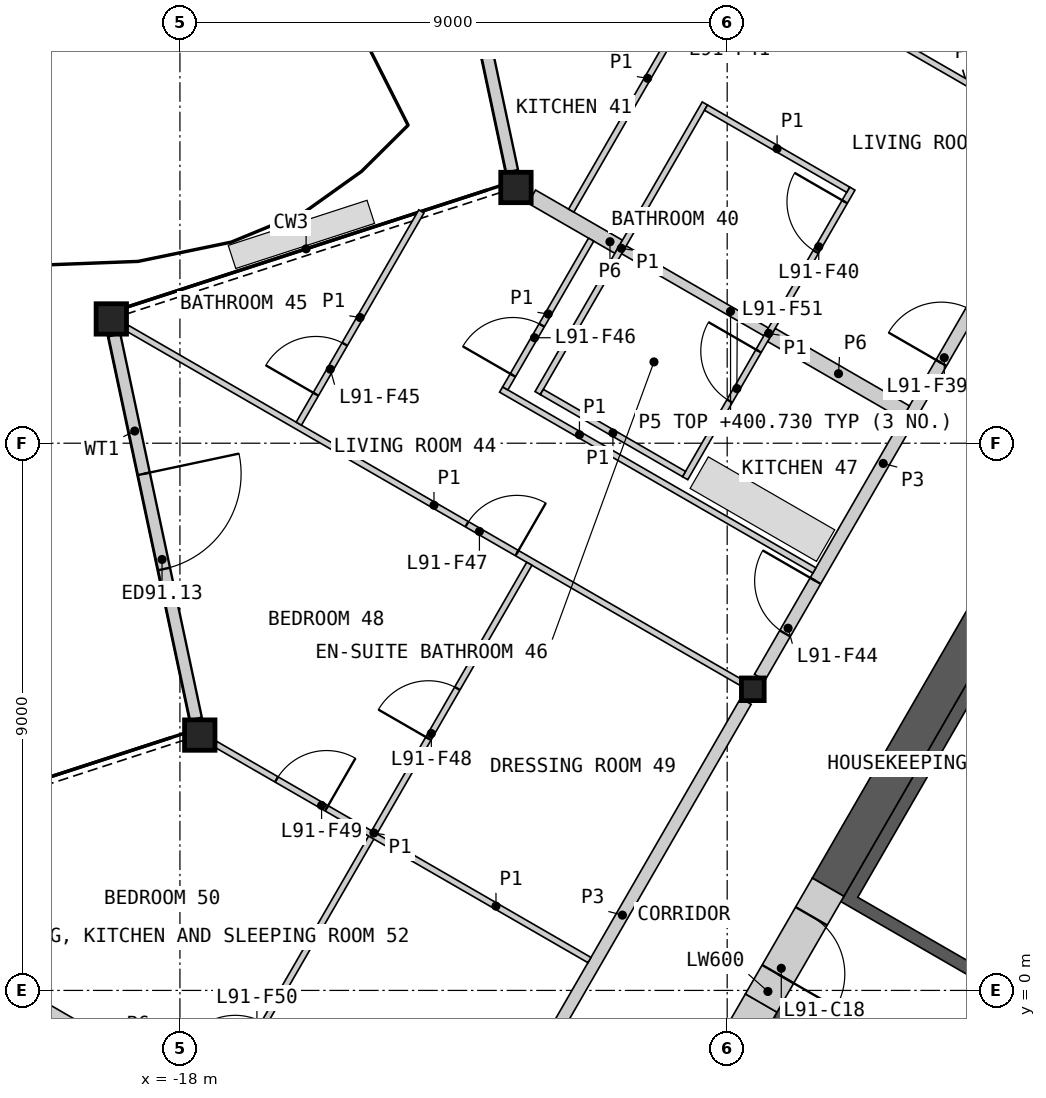
"""IFC4 building model, lengths in metres.
Left out: names, types, materials, properties, quantities, classifications, styles, units other than length and angle.
Written with IfcOpenShell. Run it as: python <this file> out.ifc"""

import sys

from ifc_helpers import new_model, si_unit, direction, frame, frame_2d, origin, origin_2d, place, context, subcontext, project, spatial, polyline, rectangle, hollow_rectangle, i_section, outline, extrude, element, fill, save


model = new_model("IFC4")
c1 = context("Model", 3, precision=1e-05, world=origin(), true_north=direction((0.0, 1.0)))
c2 = subcontext(c1, "Body", "Model", "MODEL_VIEW")
j1 = project(units=[si_unit("LENGTHUNIT", "METRE"), si_unit("PLANEANGLEUNIT", "RADIAN")], contexts=[c1])
p1 = place(None, origin())
s1 = spatial("IfcSite", under=j1, at=p1, CompositionType="ELEMENT")
p2 = place(p1, origin())
s2 = spatial("IfcBuilding", under=s1, at=p2, CompositionType="ELEMENT")
p3 = place(p2, frame((0.0, 0.0, 398.4)))
s3 = spatial("IfcBuildingStorey", under=s2, at=p3, CompositionType="ELEMENT", Elevation=398.4)
for number, where, z_axis, x_axis in (
    (1, (-12.474, 13.206, 0.0), (0.0, 0.0, 1.0), (1.0, 0.0, 0.0)),
    (2, (-19.129, 11.044, 0.0), (0.0, 0.0, 1.0), (1.0, 0.0, 0.0)),
    (3, (-17.674, 4.199, 0.0), (0.0, 0.0, 1.0), (1.0, 0.0, 0.0)),
):
    element("IfcColumn", number, at=place(p3, frame(where, z_axis=z_axis, x_axis=x_axis)), inside=s3, PredefinedType="COLUMN", context=c2, shape_type="SweptSolid", body=[
        extrude(hollow_rectangle(XDim=0.5, YDim=0.5, WallThickness=0.03, at=origin_2d()), origin(), (0.0, 0.0, 1.0), 3.4),
    ])
p4 = place(p3, frame((-8.578, 4.953, 0.0), z_axis=(0.0, 0.0, 1.0), x_axis=(1.0, 0.0, 0.0)))
e4 = element("IfcColumn", 4, at=p4, inside=s3, PredefinedType="COLUMN", context=c2, shape_type="SweptSolid", body=[
    extrude(i_section(OverallWidth=0.374, OverallDepth=0.372, WebThickness=0.016, FlangeThickness=0.026, at=origin_2d()), origin(), (0.0, 0.0, 1.0), 3.4),
])
p5 = place(p3, frame((-13.879, 19.785, 0.0), z_axis=(0.0, 0.0, 1.0), x_axis=(0.207895859675, -0.978150965613, 0.0)))
e5 = element("IfcWall", 5, at=p5, inside=s3, PredefinedType="SOLIDWALL", context=c2, shape_type="SweptSolid", body=[
    extrude(rectangle(XDim=6.453, YDim=0.2, at=frame_2d((3.227, 0.0))), origin(), (0.0, 0.0, 1.0), 2.634),
])
p6 = place(p5, frame((2.333, 0.0, 0.0)))
e6 = element("IfcOpeningElement", 6, at=p6, cuts=e5, PredefinedType="OPENING", context=c2, shape_type="SweptSolid", body=[
    extrude(rectangle(XDim=1.6, YDim=2.25, at=frame_2d((0.8, 1.125))), frame((0.0, 0.11, 0.0), z_axis=(0.0, -1.0, 0.0), x_axis=(1.0, 0.0, 0.0)), (0.0, 0.0, 1.0), 0.22),
])
p7 = place(p3, frame((-19.079, 10.778, 0.0), z_axis=(0.0, 0.0, 1.0), x_axis=(0.207888166349, -0.978152600718, 0.0)))
e7 = element("IfcWall", 7, at=p7, inside=s3, PredefinedType="SOLIDWALL", context=c2, shape_type="SweptSolid", body=[
    extrude(rectangle(XDim=6.453, YDim=0.2, at=frame_2d((3.227, 0.0))), origin(), (0.0, 0.0, 1.0), 2.634),
])
p8 = place(p7, frame((2.333, 0.0, 0.0)))
e8 = element("IfcOpeningElement", 8, at=p8, cuts=e7, PredefinedType="OPENING", context=c2, shape_type="SweptSolid", body=[
    extrude(rectangle(XDim=1.6, YDim=2.25, at=frame_2d((0.8, 1.125))), frame((0.0, 0.11, 0.0), z_axis=(0.0, -1.0, 0.0), x_axis=(1.0, 0.0, 0.0)), (0.0, 0.0, 1.0), 0.22),
])
p9 = place(p3, origin())
e9 = element("IfcWall", 9, at=p9, inside=s3, PredefinedType="SHEAR", context=c2, shape_type="SweptSolid", body=[
    extrude(outline(polyline([(-6.061, -1.697), (-8.231, -0.444), (-8.131, -0.271), (-5.96, -1.524), (-6.061, -1.697)])), origin(), (0.0, 0.0, 1.0), 3.1),
])
p10 = place(p3, origin())
e10 = element("IfcWall", 10, at=p10, inside=s3, PredefinedType="SHEAR", context=c2, shape_type="SweptSolid", body=[
    extrude(outline(polyline([(-4.96, 0.208), (-7.131, 1.461), (-3.731, 7.35), (-1.561, 6.097), (-1.66, 5.924), (-3.652, 7.074), (-6.852, 1.531), (-4.861, 0.381), (-4.96, 0.208)])), origin(), (0.0, 0.0, 1.0), 3.1),
])
p11 = place(p3, frame((-3.794, 7.84, 0.0), z_axis=(0.0, 0.0, 1.0), x_axis=(-0.499974747889, -0.866039982607, 0.0)))
e11 = element("IfcWall", 11, at=p11, inside=s3, PredefinedType="SHEAR", context=c2, shape_type="SweptSolid", body=[
    extrude(rectangle(XDim=7.092, YDim=0.6, at=frame_2d((3.546, 0.0))), origin(), (0.0, 0.0, 1.0), 3.1),
])
p12 = place(p3, frame((-8.44, -0.208, 0.0), z_axis=(0.0, 0.0, 1.0), x_axis=(-0.499997052475, -0.866027105532, 0.0)))
e12 = element("IfcWall", 12, at=p12, inside=s3, PredefinedType="SHEAR", context=c2, shape_type="SweptSolid", body=[
    extrude(rectangle(XDim=3.001, YDim=0.6, at=frame_2d((1.501, 0.0))), origin(), (0.0, 0.0, 1.0), 3.1),
])
p13 = place(p12, frame((1.4, 0.0, 0.0)))
e13 = element("IfcOpeningElement", 13, at=p13, cuts=e12, PredefinedType="OPENING", context=c2, shape_type="SweptSolid", body=[
    extrude(rectangle(XDim=1.0, YDim=2.1, at=frame_2d((0.5, 1.05))), frame((0.0, 0.31, 0.0), z_axis=(0.0, -1.0, 0.0), x_axis=(1.0, 0.0, 0.0)), (0.0, 0.0, 1.0), 0.62),
])
p14 = place(p3, frame((-7.34, 1.698, 0.0), z_axis=(0.0, 0.0, 1.0), x_axis=(-0.50002983664, -0.866008176907, 0.0)))
e14 = element("IfcWall", 14, at=p14, inside=s3, PredefinedType="SHEAR", context=c2, shape_type="SweptSolid", body=[
    extrude(rectangle(XDim=2.2, YDim=0.6, at=frame_2d((1.1, 0.0))), origin(), (0.0, 0.0, 1.0), 3.1),
])
p15 = place(p14, frame((0.55, 0.0, 0.0)))
e15 = element("IfcOpeningElement", 15, at=p15, cuts=e14, PredefinedType="OPENING", context=c2, shape_type="SweptSolid", body=[
    extrude(rectangle(XDim=1.1, YDim=2.1, at=frame_2d((0.55, 1.05))), frame((0.0, 0.31, 0.0), z_axis=(0.0, -1.0, 0.0), x_axis=(1.0, 0.0, 0.0)), (0.0, 0.0, 1.0), 0.62),
])
p16 = place(p3, frame((-24.069, 1.887, 0.0), z_axis=(0.0, 0.0, 1.0), x_axis=(0.866023404247, -0.500003463284, 0.0)))
e16 = element("IfcWall", 16, at=p16, inside=s3, PredefinedType="PARTITIONING", context=c2, shape_type="SweptSolid", body=[
    extrude(rectangle(XDim=11.782, YDim=0.25, at=frame_2d((5.891, 0.0))), origin(), (0.0, 0.0, 1.0), 2.33),
])
p17 = place(p3, frame((-8.465, 5.15, 0.0), z_axis=(0.0, 0.0, 1.0), x_axis=(0.499992155518, 0.866029932751, 0.0)))
e17 = element("IfcWall", 17, at=p17, inside=s3, PredefinedType="PARTITIONING", context=c2, shape_type="SweptSolid", body=[
    extrude(rectangle(XDim=8.123, YDim=0.2, at=frame_2d((4.062, 0.0))), origin(), (0.0, 0.0, 1.0), 3.1),
])
p18 = place(p17, frame((5.97, 0.0, 0.0)))
e18 = element("IfcOpeningElement", 18, at=p18, cuts=e17, PredefinedType="OPENING", context=c2, shape_type="SweptSolid", body=[
    extrude(rectangle(XDim=1.0, YDim=2.1, at=frame_2d((0.5, 1.05))), frame((0.0, 0.11, 0.0), z_axis=(0.0, -1.0, 0.0), x_axis=(1.0, 0.0, 0.0)), (0.0, 0.0, 1.0), 0.22),
])
p19 = place(p17, frame((0.832, 0.0, 0.0)))
e19 = element("IfcOpeningElement", 19, at=p19, cuts=e17, PredefinedType="OPENING", context=c2, shape_type="SweptSolid", body=[
    extrude(rectangle(XDim=1.0, YDim=2.1, at=frame_2d((0.5, 1.05))), frame((0.0, 0.11, 0.0), z_axis=(0.0, -1.0, 0.0), x_axis=(1.0, 0.0, 0.0)), (0.0, 0.0, 1.0), 0.22),
])
p20 = place(p3, frame((-12.754, -2.279, 0.0), z_axis=(0.0, 0.0, 1.0), x_axis=(0.500001682468, 0.866024432409, 0.0)))
e20 = element("IfcWall", 20, at=p20, inside=s3, PredefinedType="PARTITIONING", context=c2, shape_type="SweptSolid", body=[
    extrude(rectangle(XDim=8.124, YDim=0.2, at=frame_2d((4.062, 0.0))), origin(), (0.0, 0.0, 1.0), 3.1),
])
p21 = place(p3, frame((-8.273, 10.781, 0.0), z_axis=(0.0, 0.0, 1.0), x_axis=(0.866030925526, -0.499990435942, 0.0)))
e21 = element("IfcWall", 21, at=p21, inside=s3, PredefinedType="PARTITIONING", context=c2, shape_type="SweptSolid", body=[
    extrude(rectangle(XDim=2.55, YDim=0.25, at=frame_2d((1.275, 0.0))), origin(), (0.0, 0.0, 1.0), 2.33),
])
p22 = place(p3, frame((-12.214, 13.056, 0.0), z_axis=(0.0, 0.0, 1.0), x_axis=(0.866040211805, -0.499974350878, 0.0)))
e22 = element("IfcWall", 22, at=p22, inside=s3, PredefinedType="PARTITIONING", context=c2, shape_type="SweptSolid", body=[
    extrude(rectangle(XDim=1.65, YDim=0.25, at=frame_2d((0.825, 0.0))), origin(), (0.0, 0.0, 1.0), 2.33),
])
p23 = place(p3, frame((-10.698, 12.181, 0.0), z_axis=(0.0, 0.0, 1.0), x_axis=(0.86599734893, -0.500048589285, 0.0)))
e23 = element("IfcWall", 23, at=p23, inside=s3, PredefinedType="PLUMBINGWALL", context=c2, shape_type="SweptSolid", body=[
    extrude(rectangle(XDim=2.7, YDim=0.15, at=frame_2d((1.35, 0.0))), origin(), (0.0, 0.0, 1.0), 2.33),
])
p24 = place(p3, frame((-13.669, 19.9, 0.0), z_axis=(0.0, 0.0, 1.0), x_axis=(0.866032376801, -0.499987922186, 0.0)))
e24 = element("IfcWall", 24, at=p24, inside=s3, PredefinedType="PARTITIONING", context=c2, shape_type="SweptSolid", body=[
    extrude(rectangle(XDim=11.782, YDim=0.1, at=frame_2d((5.891, 0.0))), origin(), (0.0, 0.0, 1.0), 2.33),
])
p25 = place(p24, frame((3.661, 0.0, 0.0)))
e25 = element("IfcOpeningElement", 25, at=p25, cuts=e24, PredefinedType="OPENING", context=c2, shape_type="SweptSolid", body=[
    extrude(rectangle(XDim=0.95, YDim=2.1, at=frame_2d((0.475, 1.05))), frame((0.0, 0.06, 0.0), z_axis=(0.0, -1.0, 0.0), x_axis=(1.0, 0.0, 0.0)), (0.0, 0.0, 1.0), 0.12),
])
p26 = place(p3, frame((-18.869, 10.894, 0.0), z_axis=(0.0, 0.0, 1.0), x_axis=(0.866023724155, -0.500002909193, 0.0)))
e26 = element("IfcWall", 26, at=p26, inside=s3, PredefinedType="PARTITIONING", context=c2, shape_type="SweptSolid", body=[
    extrude(rectangle(XDim=11.655, YDim=0.1, at=frame_2d((5.827, 0.0))), origin(), (0.0, 0.0, 1.0), 2.33),
])
p27 = place(p26, frame((6.453, 0.0, 0.0)))
e27 = element("IfcOpeningElement", 27, at=p27, cuts=e26, PredefinedType="OPENING", context=c2, shape_type="SweptSolid", body=[
    extrude(rectangle(XDim=0.95, YDim=2.1, at=frame_2d((0.475, 1.05))), frame((0.0, 0.06, 0.0), z_axis=(0.0, -1.0, 0.0), x_axis=(1.0, 0.0, 0.0)), (0.0, 0.0, 1.0), 0.12),
])
p28 = place(p3, frame((-17.366, -1.838, 0.0), z_axis=(0.0, 0.0, 1.0), x_axis=(0.499998717582, 0.866026144187, 0.0)))
e28 = element("IfcWall", 28, at=p28, inside=s3, PredefinedType="PARTITIONING", context=c2, shape_type="SweptSolid", body=[
    extrude(rectangle(XDim=10.225, YDim=0.1, at=frame_2d((5.113, 0.0))), origin(), (0.0, 0.0, 1.0), 2.33),
])
p29 = place(p28, frame((6.907, 0.0, 0.0)))
e29 = element("IfcOpeningElement", 29, at=p29, cuts=e28, PredefinedType="OPENING", context=c2, shape_type="SweptSolid", body=[
    extrude(rectangle(XDim=0.95, YDim=2.1, at=frame_2d((0.475, 1.05))), frame((0.0, 0.06, 0.0), z_axis=(0.0, -1.0, 0.0), x_axis=(1.0, 0.0, 0.0)), (0.0, 0.0, 1.0), 0.12),
])
p30 = place(p28, frame((0.552, 0.0, 0.0)))
e30 = element("IfcOpeningElement", 30, at=p30, cuts=e28, PredefinedType="OPENING", context=c2, shape_type="SweptSolid", body=[
    extrude(rectangle(XDim=0.95, YDim=2.1, at=frame_2d((0.475, 1.05))), frame((0.0, 0.06, 0.0), z_axis=(0.0, -1.0, 0.0), x_axis=(1.0, 0.0, 0.0)), (0.0, 0.0, 1.0), 0.12),
])
p31 = place(p3, frame((-17.414, 4.049, 0.0), z_axis=(0.0, 0.0, 1.0), x_axis=(0.866033839264, -0.499985389037, 0.0)))
e31 = element("IfcWall", 31, at=p31, inside=s3, PredefinedType="PARTITIONING", context=c2, shape_type="SweptSolid", body=[
    extrude(rectangle(XDim=7.1, YDim=0.1, at=frame_2d((3.55, 0.0))), origin(), (0.0, 0.0, 1.0), 2.33),
])
p32 = place(p31, frame((1.158, 0.0, 0.0)))
e32 = element("IfcOpeningElement", 32, at=p32, cuts=e31, PredefinedType="OPENING", context=c2, shape_type="SweptSolid", body=[
    extrude(rectangle(XDim=0.95, YDim=2.1, at=frame_2d((0.475, 1.05))), frame((0.0, 0.06, 0.0), z_axis=(0.0, -1.0, 0.0), x_axis=(1.0, 0.0, 0.0)), (0.0, 0.0, 1.0), 0.12),
])
p33 = place(p3, frame((-12.718, 9.883, 0.0), z_axis=(0.0, 0.0, 1.0), x_axis=(0.866017493347, -0.500013701029, 0.0)))
e33 = element("IfcWall", 33, at=p33, inside=s3, PredefinedType="PARTITIONING", context=c2, shape_type="SweptSolid", body=[
    extrude(rectangle(XDim=5.95, YDim=0.1, at=frame_2d((2.975, 0.0))), origin(), (0.0, 0.0, 1.0), 2.33),
])
p34 = place(p3, frame((-12.117, 9.824, 0.0), z_axis=(0.0, 0.0, 1.0), x_axis=(0.499996545922, 0.866027397988, 0.0)))
e34 = element("IfcWall", 34, at=p34, inside=s3, PredefinedType="PARTITIONING", context=c2, shape_type="SweptSolid", body=[
    extrude(rectangle(XDim=5.5, YDim=0.1, at=frame_2d((2.75, 0.0))), origin(), (0.0, 0.0, 1.0), 2.33),
])
p35 = place(p3, frame((-9.692, 8.425, 0.0), z_axis=(0.0, 0.0, 1.0), x_axis=(0.499996545922, 0.866027397988, 0.0)))
e35 = element("IfcWall", 35, at=p35, inside=s3, PredefinedType="PARTITIONING", context=c2, shape_type="SweptSolid", body=[
    extrude(rectangle(XDim=5.5, YDim=0.1, at=frame_2d((2.75, 0.0))), origin(), (0.0, 0.0, 1.0), 2.33),
])
p36 = place(p35, frame((4.3, 0.0, 0.0)))
e36 = element("IfcOpeningElement", 36, at=p36, cuts=e35, PredefinedType="OPENING", context=c2, shape_type="SweptSolid", body=[
    extrude(rectangle(XDim=0.95, YDim=2.1, at=frame_2d((0.475, 1.05))), frame((0.0, 0.06, 0.0), z_axis=(0.0, -1.0, 0.0), x_axis=(1.0, 0.0, 0.0)), (0.0, 0.0, 1.0), 0.12),
])
p37 = place(p35, frame((1.465, 0.0, 0.0)))
e37 = element("IfcOpeningElement", 37, at=p37, cuts=e35, PredefinedType="OPENING", context=c2, shape_type="SweptSolid", body=[
    extrude(rectangle(XDim=0.95, YDim=2.1, at=frame_2d((0.475, 1.05))), frame((0.0, 0.06, 0.0), z_axis=(0.0, -1.0, 0.0), x_axis=(1.0, 0.0, 0.0)), (0.0, 0.0, 1.0), 0.12),
])
p38 = place(p3, frame((-11.565, 12.826, 0.0), z_axis=(0.0, 0.0, 1.0), x_axis=(0.499990214365, 0.86603105345, 0.0)))
e38 = element("IfcWall", 38, at=p38, inside=s3, PredefinedType="PARTITIONING", context=c2, shape_type="SweptSolid", body=[
    extrude(rectangle(XDim=5.025, YDim=0.1, at=frame_2d((2.512, 0.0))), origin(), (0.0, 0.0, 1.0), 2.33),
])
p39 = place(p38, frame((3.11, 0.0, 0.0)))
e39 = element("IfcOpeningElement", 39, at=p39, cuts=e38, PredefinedType="OPENING", context=c2, shape_type="SweptSolid", body=[
    extrude(rectangle(XDim=0.95, YDim=2.1, at=frame_2d((0.475, 1.05))), frame((0.0, 0.06, 0.0), z_axis=(0.0, -1.0, 0.0), x_axis=(1.0, 0.0, 0.0)), (0.0, 0.0, 1.0), 0.12),
])
p40 = place(p3, frame((-16.045, 9.321, 0.0), z_axis=(0.0, 0.0, 1.0), x_axis=(0.500014251897, 0.866017175291, 0.0)))
e40 = element("IfcWall", 40, at=p40, inside=s3, PredefinedType="PARTITIONING", context=c2, shape_type="SweptSolid", body=[
    extrude(rectangle(XDim=4.032, YDim=0.1, at=frame_2d((2.016, 0.0))), origin(), (0.0, 0.0, 1.0), 2.33),
])
p41 = place(p40, frame((0.56, 0.0, 0.0)))
e41 = element("IfcOpeningElement", 41, at=p41, cuts=e40, PredefinedType="OPENING", context=c2, shape_type="SweptSolid", body=[
    extrude(rectangle(XDim=0.95, YDim=2.1, at=frame_2d((0.475, 1.05))), frame((0.0, 0.06, 0.0), z_axis=(0.0, -1.0, 0.0), x_axis=(1.0, 0.0, 0.0)), (0.0, 0.0, 1.0), 0.12),
])
p42 = place(p3, frame((-12.65, 9.901, 0.0), z_axis=(0.0, 0.0, 1.0), x_axis=(0.500024172624, 0.866011447264, 0.0)))
e42 = element("IfcWall", 42, at=p42, inside=s3, PredefinedType="PARTITIONING", context=c2, shape_type="SweptSolid", body=[
    extrude(rectangle(XDim=2.825, YDim=0.1, at=frame_2d((1.413, 0.0))), origin(), (0.0, 0.0, 1.0), 2.33),
])
p43 = place(p42, frame((0.25, 0.0, 0.0)))
e43 = element("IfcOpeningElement", 43, at=p43, cuts=e42, PredefinedType="OPENING", context=c2, shape_type="SweptSolid", body=[
    extrude(rectangle(XDim=0.95, YDim=2.1, at=frame_2d((0.475, 1.05))), frame((0.0, 0.06, 0.0), z_axis=(0.0, -1.0, 0.0), x_axis=(1.0, 0.0, 0.0)), (0.0, 0.0, 1.0), 0.12),
])
for number, where, z_axis, x_axis in (
    (44, (-9.348, 14.519, 0.0), (0.0, 0.0, 1.0), (0.866, -0.5, 0.0)),
    (45, (-12.048, 9.843, 0.0), (0.0, 0.0, 1.0), (0.866, -0.5, 0.0)),
):
    element("IfcWall", number, at=place(p3, frame(where, z_axis=z_axis, x_axis=x_axis)), inside=s3, PredefinedType="PARTITIONING", context=c2, shape_type="SweptSolid", body=[
        extrude(rectangle(XDim=2.7, YDim=0.1, at=frame_2d((1.35, 0.0))), origin(), (0.0, 0.0, 1.0), 2.33),
    ])
p44 = place(p8, origin())
e46 = element("IfcDoor", 46, at=p44, inside=s3, OperationType="DOUBLE_DOOR_SINGLE_SWING", PredefinedType="DOOR", context=c2, shape_type="SweptSolid", body=[
    extrude(rectangle(XDim=1.6, YDim=2.25, at=frame_2d((0.8, 1.125))), frame((0.0, 0.025, 0.0), z_axis=(0.0, -1.0, 0.0), x_axis=(1.0, 0.0, 0.0)), (0.0, 0.0, 1.0), 0.05),
])
fill(e8, e46)
p45 = place(p15, origin())
e47 = element("IfcDoor", 47, at=p45, inside=s3, OperationType="SINGLE_SWING_RIGHT", PredefinedType="DOOR", context=c2, shape_type="SweptSolid", body=[
    extrude(rectangle(XDim=1.1, YDim=2.1, at=frame_2d((0.55, 1.05))), frame((0.0, 0.055, 0.0), z_axis=(0.0, -1.0, 0.0), x_axis=(1.0, 0.0, 0.0)), (0.0, 0.0, 1.0), 0.05),
])
fill(e15, e47)
p46 = place(p18, origin())
e48 = element("IfcDoor", 48, at=p46, inside=s3, OperationType="SINGLE_SWING_LEFT", PredefinedType="DOOR", context=c2, shape_type="SweptSolid", body=[
    extrude(rectangle(XDim=1.0, YDim=2.1, at=frame_2d((0.5, 1.05))), frame((0.0, 0.025, 0.0), z_axis=(0.0, -1.0, 0.0), x_axis=(1.0, 0.0, 0.0)), (0.0, 0.0, 1.0), 0.05),
])
fill(e18, e48)
p47 = place(p36, origin())
e49 = element("IfcDoor", 49, at=p47, inside=s3, OperationType="SINGLE_SWING_RIGHT", PredefinedType="DOOR", context=c2, shape_type="SweptSolid", body=[
    extrude(rectangle(XDim=0.95, YDim=2.1, at=frame_2d((0.475, 1.05))), frame((0.0, 0.025, 0.0), z_axis=(0.0, -1.0, 0.0), x_axis=(1.0, 0.0, 0.0)), (0.0, 0.0, 1.0), 0.05),
])
fill(e36, e49)
p48 = place(p19, origin())
e50 = element("IfcDoor", 50, at=p48, inside=s3, OperationType="SINGLE_SWING_RIGHT", PredefinedType="DOOR", context=c2, shape_type="SweptSolid", body=[
    extrude(rectangle(XDim=1.0, YDim=2.1, at=frame_2d((0.5, 1.05))), frame((0.0, 0.025, 0.0), z_axis=(0.0, -1.0, 0.0), x_axis=(1.0, 0.0, 0.0)), (0.0, 0.0, 1.0), 0.05),
])
fill(e19, e50)
p49 = place(p41, origin())
e51 = element("IfcDoor", 51, at=p49, inside=s3, OperationType="SINGLE_SWING_LEFT", PredefinedType="DOOR", context=c2, shape_type="SweptSolid", body=[
    extrude(rectangle(XDim=0.95, YDim=2.1, at=frame_2d((0.475, 1.05))), frame((0.0, 0.025, 0.0), z_axis=(0.0, -1.0, 0.0), x_axis=(1.0, 0.0, 0.0)), (0.0, 0.0, 1.0), 0.05),
])
fill(e41, e51)
p50 = place(p43, origin())
e52 = element("IfcDoor", 52, at=p50, inside=s3, OperationType="SINGLE_SWING_LEFT", PredefinedType="DOOR", context=c2, shape_type="SweptSolid", body=[
    extrude(rectangle(XDim=0.95, YDim=2.1, at=frame_2d((0.475, 1.05))), frame((0.0, 0.025, 0.0), z_axis=(0.0, -1.0, 0.0), x_axis=(1.0, 0.0, 0.0)), (0.0, 0.0, 1.0), 0.05),
])
fill(e43, e52)
p51 = place(p27, origin())
e53 = element("IfcDoor", 53, at=p51, inside=s3, OperationType="SINGLE_SWING_RIGHT", PredefinedType="DOOR", context=c2, shape_type="SweptSolid", body=[
    extrude(rectangle(XDim=0.95, YDim=2.1, at=frame_2d((0.475, 1.05))), frame((0.0, 0.025, 0.0), z_axis=(0.0, -1.0, 0.0), x_axis=(1.0, 0.0, 0.0)), (0.0, 0.0, 1.0), 0.05),
])
fill(e27, e53)
p52 = place(p29, origin())
e54 = element("IfcDoor", 54, at=p52, inside=s3, OperationType="SINGLE_SWING_LEFT", PredefinedType="DOOR", context=c2, shape_type="SweptSolid", body=[
    extrude(rectangle(XDim=0.95, YDim=2.1, at=frame_2d((0.475, 1.05))), frame((0.0, 0.025, 0.0), z_axis=(0.0, -1.0, 0.0), x_axis=(1.0, 0.0, 0.0)), (0.0, 0.0, 1.0), 0.05),
])
fill(e29, e54)
p53 = place(p32, origin())
e55 = element("IfcDoor", 55, at=p53, inside=s3, OperationType="SINGLE_SWING_RIGHT", PredefinedType="DOOR", context=c2, shape_type="SweptSolid", body=[
    extrude(rectangle(XDim=0.95, YDim=2.1, at=frame_2d((0.475, 1.05))), frame((0.0, 0.025, 0.0), z_axis=(0.0, -1.0, 0.0), x_axis=(1.0, 0.0, 0.0)), (0.0, 0.0, 1.0), 0.05),
])
fill(e32, e55)
p54 = place(p37, origin())
e56 = element("IfcDoor", 56, at=p54, inside=s3, OperationType="SINGLE_SWING_RIGHT", PredefinedType="DOOR", context=c2, shape_type="SweptSolid", body=[
    extrude(rectangle(XDim=0.95, YDim=2.1, at=frame_2d((0.475, 1.05))), frame((0.0, 0.025, 0.0), z_axis=(0.0, -1.0, 0.0), x_axis=(1.0, 0.0, 0.0)), (0.0, 0.0, 1.0), 0.05),
])
fill(e37, e56)
save(model, sys.argv[1])
